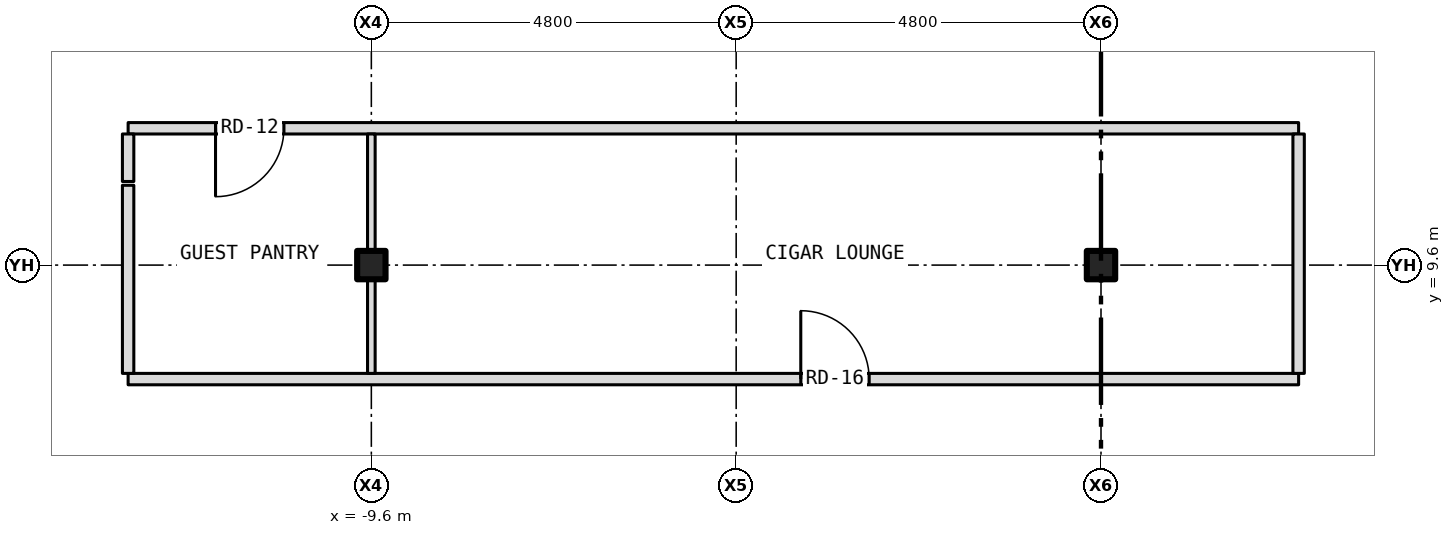
"""IFC4 building model, lengths in metres.
Left out: names, types, materials, properties, quantities, classifications, styles, units other than length and angle.
Written with IfcOpenShell. Run it as: python <this file> out.ifc"""

import sys

from ifc_helpers import new_model, si_unit, direction, frame, frame_2d, origin, origin_2d, place, context, subcontext, project, spatial, rectangle, i_section, extrude, element, fill, save


model = new_model("IFC4")
c1 = context("Model", 3, precision=1e-05, world=origin(), true_north=direction((0.0, 1.0)))
c2 = subcontext(c1, "Body", "Model", "MODEL_VIEW")
j1 = project(units=[si_unit("LENGTHUNIT", "METRE"), si_unit("PLANEANGLEUNIT", "RADIAN")], contexts=[c1])
p1 = place(None, origin())
s1 = spatial("IfcSite", under=j1, at=p1, CompositionType="ELEMENT")
p2 = place(p1, origin())
s2 = spatial("IfcBuilding", under=s1, at=p2, CompositionType="ELEMENT")
p3 = place(p2, frame((0.0, 0.0, 158.5)))
s3 = spatial("IfcBuildingStorey", under=s2, at=p3, CompositionType="ELEMENT", Elevation=158.5)
for number, where, z_axis, x_axis in (
    (1, (-9.6, 9.6, -0.15), (0.0, 0.0, 1.0), (1.0, 0.0, 0.0)),
    (2, (0.0, 9.6, -0.15), (0.0, 0.0, 1.0), (1.0, 0.0, 0.0)),
):
    element("IfcColumn", number, at=place(p3, frame(where, z_axis=z_axis, x_axis=x_axis)), inside=s3, PredefinedType="COLUMN", context=c2, shape_type="SweptSolid", body=[
        extrude(i_section(OverallWidth=0.373, OverallDepth=0.373, WebThickness=0.016, FlangeThickness=0.026, at=origin_2d()), origin(), (0.0, 0.0, 1.0), 3.5),
    ])
p4 = place(p3, frame((-12.8, 8.1, 0.0), z_axis=(0.0, 0.0, 1.0), x_axis=(1.0, 0.0, 0.0)))
e3 = element("IfcWall", 3, at=p4, inside=s3, PredefinedType="PARTITIONING", context=c2, shape_type="SweptSolid", body=[
    extrude(rectangle(XDim=15.4, YDim=0.15, at=frame_2d((7.7, 0.0))), origin(), (0.0, 0.0, 1.0), 3.35),
])
p5 = place(p4, frame((8.85, 0.0, 0.0)))
e4 = element("IfcOpeningElement", 4, at=p5, cuts=e3, PredefinedType="OPENING", context=c2, shape_type="SweptSolid", body=[
    extrude(rectangle(XDim=0.9, YDim=2.1, at=frame_2d((0.45, 1.05))), frame((0.0, 0.087, 0.0), z_axis=(0.0, -1.0, 0.0), x_axis=(1.0, 0.0, 0.0)), (0.0, 0.0, 1.0), 0.174),
])
p6 = place(p3, frame((-12.8, 11.4, 0.0), z_axis=(0.0, 0.0, 1.0), x_axis=(1.0, 0.0, 0.0)))
e5 = element("IfcWall", 5, at=p6, inside=s3, PredefinedType="PARTITIONING", context=c2, shape_type="SweptSolid", body=[
    extrude(rectangle(XDim=15.4, YDim=0.15, at=frame_2d((7.7, 0.0))), origin(), (0.0, 0.0, 1.0), 3.35),
])
p7 = place(p6, frame((1.15, 0.0, 0.0)))
e6 = element("IfcOpeningElement", 6, at=p7, cuts=e5, PredefinedType="OPENING", context=c2, shape_type="SweptSolid", body=[
    extrude(rectangle(XDim=0.9, YDim=2.1, at=frame_2d((0.45, 1.05))), frame((0.0, 0.087, 0.0), z_axis=(0.0, -1.0, 0.0), x_axis=(1.0, 0.0, 0.0)), (0.0, 0.0, 1.0), 0.174),
])
p8 = place(p3, frame((-12.8, 8.175, 0.0), z_axis=(0.0, 0.0, 1.0), x_axis=(0.0, 1.0, 0.0)))
e7 = element("IfcWall", 7, at=p8, inside=s3, PredefinedType="PARTITIONING", context=c2, shape_type="SweptSolid", body=[
    extrude(rectangle(XDim=2.475, YDim=0.15, at=frame_2d((1.237, 0.0))), origin(), (0.0, 0.0, 1.0), 3.35),
])
p9 = place(p3, frame((-12.8, 10.7, 0.0), z_axis=(0.0, 0.0, 1.0), x_axis=(0.0, 1.0, 0.0)))
e8 = element("IfcWall", 8, at=p9, inside=s3, PredefinedType="PARTITIONING", context=c2, shape_type="SweptSolid", body=[
    extrude(rectangle(XDim=0.625, YDim=0.15, at=frame_2d((0.312, 0.0))), origin(), (0.0, 0.0, 1.0), 3.35),
])
p10 = place(p3, frame((-9.6, 8.175, 0.0), z_axis=(0.0, 0.0, 1.0), x_axis=(0.0, 1.0, 0.0)))
e9 = element("IfcWall", 9, at=p10, inside=s3, PredefinedType="PARTITIONING", context=c2, shape_type="SweptSolid", body=[
    extrude(rectangle(XDim=1.238, YDim=0.1, at=frame_2d((0.619, 0.0))), origin(), (0.0, 0.0, 1.0), 2.728),
])
p11 = place(p3, frame((-9.6, 9.413, 0.0), z_axis=(0.0, 0.0, 1.0), x_axis=(0.0, 1.0, 0.0)))
e10 = element("IfcWall", 10, at=p11, inside=s3, PredefinedType="PARTITIONING", context=c2, shape_type="SweptSolid", body=[
    extrude(rectangle(XDim=0.374, YDim=0.1, at=frame_2d((0.187, 0.0))), origin(), (0.0, 0.0, 1.0), 3.35),
])
p12 = place(p3, frame((-9.6, 9.787, 0.0), z_axis=(0.0, 0.0, 1.0), x_axis=(0.0, 1.0, 0.0)))
e11 = element("IfcWall", 11, at=p12, inside=s3, PredefinedType="PARTITIONING", context=c2, shape_type="SweptSolid", body=[
    extrude(rectangle(XDim=1.538, YDim=0.1, at=frame_2d((0.769, 0.0))), origin(), (0.0, 0.0, 1.0), 2.728),
])
p13 = place(p3, frame((2.6, 8.175, 0.0), z_axis=(0.0, 0.0, 1.0), x_axis=(0.0, 1.0, 0.0)))
e12 = element("IfcWall", 12, at=p13, inside=s3, PredefinedType="PARTITIONING", context=c2, shape_type="SweptSolid", body=[
    extrude(rectangle(XDim=3.15, YDim=0.15, at=frame_2d((1.575, 0.0))), origin(), (0.0, 0.0, 1.0), 3.35),
])
p14 = place(p7, origin())
e13 = element("IfcDoor", 13, at=p14, inside=s3, OperationType="SINGLE_SWING_LEFT", PredefinedType="DOOR", context=c2, shape_type="SweptSolid", body=[
    extrude(rectangle(XDim=0.9, YDim=2.1, at=frame_2d((0.45, 1.05))), frame((0.0, 0.025, 0.0), z_axis=(0.0, -1.0, 0.0), x_axis=(1.0, 0.0, 0.0)), (0.0, 0.0, 1.0), 0.05),
])
fill(e6, e13)
p15 = place(p5, origin())
e14 = element("IfcDoor", 14, at=p15, inside=s3, OperationType="SINGLE_SWING_LEFT", PredefinedType="DOOR", context=c2, shape_type="SweptSolid", body=[
    extrude(rectangle(XDim=0.9, YDim=2.1, at=frame_2d((0.45, 1.05))), frame((0.0, 0.025, 0.0), z_axis=(0.0, -1.0, 0.0), x_axis=(1.0, 0.0, 0.0)), (0.0, 0.0, 1.0), 0.05),
])
fill(e4, e14)
save(model, sys.argv[1])
